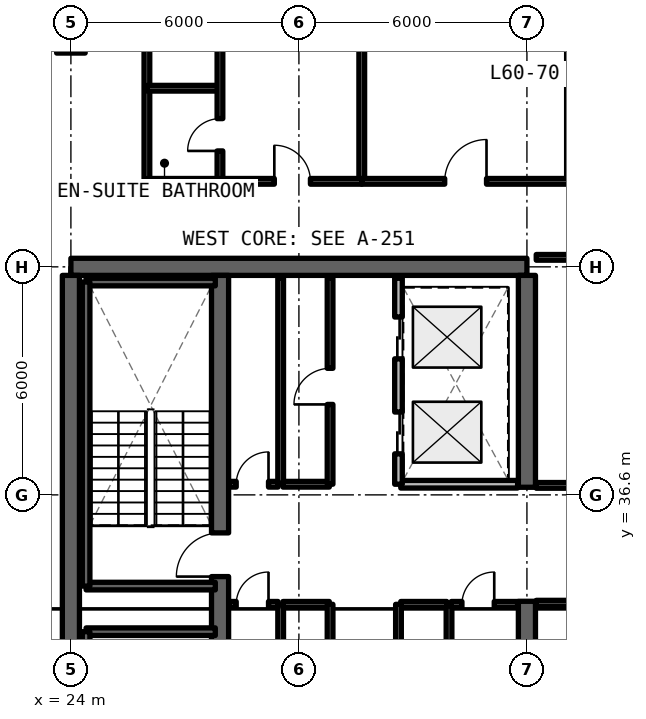
"""IFC4 building model, lengths in metres.
Left out: names, types, materials, properties, quantities, classifications, styles, units other than length and angle.
Written with IfcOpenShell. Run it as: python <this file> out.ifc"""

import sys

from ifc_helpers import new_model, si_unit, direction, frame, frame_2d, origin, origin_2d, place, context, subcontext, project, spatial, rectangle, extrude, element, fill, save


model = new_model("IFC4")
c1 = context("Model", 3, precision=1e-05, world=origin(), true_north=direction((0.0, 1.0)))
c2 = subcontext(c1, "Body", "Model", "MODEL_VIEW")
j1 = project(units=[si_unit("LENGTHUNIT", "METRE"), si_unit("PLANEANGLEUNIT", "RADIAN")], contexts=[c1])
p1 = place(None, origin())
s1 = spatial("IfcSite", under=j1, at=p1, CompositionType="ELEMENT")
p2 = place(p1, origin())
s2 = spatial("IfcBuilding", under=s1, at=p2, CompositionType="ELEMENT")
p3 = place(p2, frame((0.0, 0.0, 215.49)))
s3 = spatial("IfcBuildingStorey", under=s2, at=p3, CompositionType="ELEMENT", Elevation=215.49)
p4 = place(p3, frame((36.0, 42.6, 0.0), z_axis=(0.0, 0.0, 1.0), x_axis=(-1.0, 0.0, 0.0)))
e1 = element("IfcWall", 1, at=p4, inside=s3, PredefinedType="SHEAR", context=c2, shape_type="SweptSolid", body=[
    extrude(rectangle(XDim=12.0, YDim=0.45, at=frame_2d((6.0, 0.0))), origin(), (0.0, 0.0, 1.0), 3.63),
])
p5 = place(p3, frame((24.0, 24.825, 0.0), z_axis=(0.0, 0.0, 1.0), x_axis=(0.0, 1.0, 0.0)))
e2 = element("IfcWall", 2, at=p5, inside=s3, PredefinedType="SHEAR", context=c2, shape_type="SweptSolid", body=[
    extrude(rectangle(XDim=17.55, YDim=0.45, at=frame_2d((8.775, 0.0))), origin(), (0.0, 0.0, 1.0), 3.63),
])
p6 = place(p3, frame((36.0, 24.825, 0.0), z_axis=(0.0, 0.0, 1.0), x_axis=(0.0, 1.0, 0.0)))
e3 = element("IfcWall", 3, at=p6, inside=s3, PredefinedType="SHEAR", context=c2, shape_type="SweptSolid", body=[
    extrude(rectangle(XDim=8.975, YDim=0.45, at=frame_2d((4.488, 0.0))), origin(), (0.0, 0.0, 1.0), 3.63),
])
p7 = place(p3, frame((36.0, 36.8, 0.0), z_axis=(0.0, 0.0, 1.0), x_axis=(0.0, 1.0, 0.0)))
e4 = element("IfcWall", 4, at=p7, inside=s3, PredefinedType="SHEAR", context=c2, shape_type="SweptSolid", body=[
    extrude(rectangle(XDim=5.575, YDim=0.45, at=frame_2d((2.788, 0.0))), origin(), (0.0, 0.0, 1.0), 3.63),
])
p8 = place(p3, frame((27.925, 24.825, 0.0), z_axis=(0.0, 0.0, 1.0), x_axis=(0.0, 1.0, 0.0)))
e5 = element("IfcWall", 5, at=p8, inside=s3, PredefinedType="SHEAR", context=c2, shape_type="SweptSolid", body=[
    extrude(rectangle(XDim=17.55, YDim=0.45, at=frame_2d((8.775, 0.0))), origin(), (0.0, 0.0, 1.0), 3.63),
])
p9 = place(p8, frame((0.425, 0.0, 0.0)))
e6 = element("IfcOpeningElement", 6, at=p9, cuts=e5, PredefinedType="OPENING", context=c2, shape_type="SweptSolid", body=[
    extrude(rectangle(XDim=1.15, YDim=2.15, at=frame_2d((0.575, 1.075))), frame((0.0, 0.235, 0.0), z_axis=(0.0, -1.0, 0.0), x_axis=(1.0, 0.0, 0.0)), (0.0, 0.0, 1.0), 0.47),
])
p10 = place(p8, frame((9.625, 0.0, 0.0)))
e7 = element("IfcOpeningElement", 7, at=p10, cuts=e5, PredefinedType="OPENING", context=c2, shape_type="SweptSolid", body=[
    extrude(rectangle(XDim=1.15, YDim=2.15, at=frame_2d((0.575, 1.075))), frame((0.0, 0.235, 0.0), z_axis=(0.0, -1.0, 0.0), x_axis=(1.0, 0.0, 0.0)), (0.0, 0.0, 1.0), 0.47),
])
p11 = place(p3, frame((24.0, 48.6, 0.0), z_axis=(0.0, 0.0, 1.0), x_axis=(1.0, 0.0, 0.0)))
e8 = element("IfcColumn", 8, at=p11, inside=s3, PredefinedType="COLUMN", context=c2, shape_type="SweptSolid", body=[
    extrude(rectangle(XDim=0.75, YDim=0.75, at=origin_2d()), origin(), (0.0, 0.0, 1.0), 3.63),
])
p12 = place(p3, frame((29.52, 28.5, 0.0), z_axis=(0.0, 0.0, 1.0), x_axis=(0.0, 1.0, 0.0)))
e9 = element("IfcWall", 9, at=p12, inside=s3, PredefinedType="SOLIDWALL", context=c2, shape_type="SweptSolid", body=[
    extrude(rectangle(XDim=5.22, YDim=0.15, at=frame_2d((2.61, 0.0))), origin(), (0.0, 0.0, 1.0), 2.63),
])
p13 = place(p3, frame((28.17, 33.72, 0.0), z_axis=(0.0, 0.0, 1.0), x_axis=(1.0, 0.0, 0.0)))
e10 = element("IfcWall", 10, at=p13, inside=s3, PredefinedType="SOLIDWALL", context=c2, shape_type="SweptSolid", body=[
    extrude(rectangle(XDim=1.28, YDim=0.15, at=frame_2d((0.64, 0.0))), origin(), (0.0, 0.0, 1.0), 2.63),
])
p14 = place(p13, frame((0.18, 0.0, 0.0)))
e11 = element("IfcOpeningElement", 11, at=p14, cuts=e10, PredefinedType="OPENING", context=c2, shape_type="SweptSolid", body=[
    extrude(rectangle(XDim=0.85, YDim=2.1, at=frame_2d((0.425, 1.05))), frame((0.0, 0.085, 0.0), z_axis=(0.0, -1.0, 0.0), x_axis=(1.0, 0.0, 0.0)), (0.0, 0.0, 1.0), 0.17),
])
p15 = place(p3, frame((29.58, 33.72, 0.0), z_axis=(0.0, 0.0, 1.0), x_axis=(1.0, 0.0, 0.0)))
e12 = element("IfcWall", 12, at=p15, inside=s3, PredefinedType="SOLIDWALL", context=c2, shape_type="SweptSolid", body=[
    extrude(rectangle(XDim=1.22, YDim=0.15, at=frame_2d((0.61, 0.0))), origin(), (0.0, 0.0, 1.0), 2.63),
])
p16 = place(p3, frame((30.82, 28.5, 0.0), z_axis=(0.0, 0.0, 1.0), x_axis=(0.0, 1.0, 0.0)))
e13 = element("IfcWall", 13, at=p16, inside=s3, PredefinedType="SOLIDWALL", context=c2, shape_type="SweptSolid", body=[
    extrude(rectangle(XDim=5.22, YDim=0.15, at=frame_2d((2.61, 0.0))), origin(), (0.0, 0.0, 1.0), 2.63),
])
p17 = place(p16, frame((2.0, 0.0, 0.0)))
e14 = element("IfcOpeningElement", 14, at=p17, cuts=e13, PredefinedType="OPENING", context=c2, shape_type="SweptSolid", body=[
    extrude(rectangle(XDim=0.95, YDim=2.15, at=frame_2d((0.475, 1.075))), frame((0.0, 0.085, 0.0), z_axis=(0.0, -1.0, 0.0), x_axis=(1.0, 0.0, 0.0)), (0.0, 0.0, 1.0), 0.17),
])
p18 = place(p3, frame((33.95, 28.5, 0.0), z_axis=(0.0, 0.0, 1.0), x_axis=(0.0, 1.0, 0.0)))
e15 = element("IfcWall", 15, at=p18, inside=s3, PredefinedType="SOLIDWALL", context=c2, shape_type="SweptSolid", body=[
    extrude(rectangle(XDim=5.22, YDim=0.15, at=frame_2d((2.61, 0.0))), origin(), (0.0, 0.0, 1.0), 2.63),
])
p19 = place(p3, frame((32.68, 33.72, 0.0), z_axis=(0.0, 0.0, 1.0), x_axis=(1.0, 0.0, 0.0)))
e16 = element("IfcWall", 16, at=p19, inside=s3, PredefinedType="SOLIDWALL", context=c2, shape_type="SweptSolid", body=[
    extrude(rectangle(XDim=1.21, YDim=0.15, at=frame_2d((0.605, 0.0))), origin(), (0.0, 0.0, 1.0), 2.63),
])
p20 = place(p3, frame((34.01, 33.72, 0.0), z_axis=(0.0, 0.0, 1.0), x_axis=(1.0, 0.0, 0.0)))
e17 = element("IfcWall", 17, at=p20, inside=s3, PredefinedType="SOLIDWALL", context=c2, shape_type="SweptSolid", body=[
    extrude(rectangle(XDim=1.745, YDim=0.15, at=frame_2d((0.873, 0.0))), origin(), (0.0, 0.0, 1.0), 2.63),
])
p21 = place(p20, frame((0.28, 0.0, 0.0)))
e18 = element("IfcOpeningElement", 18, at=p21, cuts=e17, PredefinedType="OPENING", context=c2, shape_type="SweptSolid", body=[
    extrude(rectangle(XDim=0.85, YDim=2.1, at=frame_2d((0.425, 1.05))), frame((0.0, 0.085, 0.0), z_axis=(0.0, -1.0, 0.0), x_axis=(1.0, 0.0, 0.0)), (0.0, 0.0, 1.0), 0.17),
])
p22 = place(p3, frame((32.62, 28.5, 0.0), z_axis=(0.0, 0.0, 1.0), x_axis=(0.0, 1.0, 0.0)))
e19 = element("IfcWall", 19, at=p22, inside=s3, PredefinedType="SOLIDWALL", context=c2, shape_type="SweptSolid", body=[
    extrude(rectangle(XDim=5.22, YDim=0.15, at=frame_2d((2.61, 0.0))), origin(), (0.0, 0.0, 1.0), 2.63),
])
p23 = place(p22, frame((2.0, 0.0, 0.0)))
e20 = element("IfcOpeningElement", 20, at=p23, cuts=e19, PredefinedType="OPENING", context=c2, shape_type="SweptSolid", body=[
    extrude(rectangle(XDim=0.95, YDim=2.15, at=frame_2d((0.475, 1.075))), frame((0.0, 0.085, 0.0), z_axis=(0.0, -1.0, 0.0), x_axis=(1.0, 0.0, 0.0)), (0.0, 0.0, 1.0), 0.17),
])
p24 = place(p3, frame((29.52, 36.88, 0.0), z_axis=(0.0, 0.0, 1.0), x_axis=(0.0, 1.0, 0.0)))
e21 = element("IfcWall", 21, at=p24, inside=s3, PredefinedType="SOLIDWALL", context=c2, shape_type="SweptSolid", body=[
    extrude(rectangle(XDim=5.42, YDim=0.15, at=frame_2d((2.71, 0.0))), origin(), (0.0, 0.0, 1.0), 2.63),
])
p25 = place(p3, frame((28.17, 36.88, 0.0), z_axis=(0.0, 0.0, 1.0), x_axis=(1.0, 0.0, 0.0)))
e22 = element("IfcWall", 22, at=p25, inside=s3, PredefinedType="SOLIDWALL", context=c2, shape_type="SweptSolid", body=[
    extrude(rectangle(XDim=1.28, YDim=0.15, at=frame_2d((0.64, 0.0))), origin(), (0.0, 0.0, 1.0), 2.63),
])
p26 = place(p25, frame((0.18, 0.0, 0.0)))
e23 = element("IfcOpeningElement", 23, at=p26, cuts=e22, PredefinedType="OPENING", context=c2, shape_type="SweptSolid", body=[
    extrude(rectangle(XDim=0.85, YDim=2.1, at=frame_2d((0.425, 1.05))), frame((0.0, 0.085, 0.0), z_axis=(0.0, -1.0, 0.0), x_axis=(1.0, 0.0, 0.0)), (0.0, 0.0, 1.0), 0.17),
])
p27 = place(p3, frame((29.58, 36.88, 0.0), z_axis=(0.0, 0.0, 1.0), x_axis=(1.0, 0.0, 0.0)))
e24 = element("IfcWall", 24, at=p27, inside=s3, PredefinedType="SOLIDWALL", context=c2, shape_type="SweptSolid", body=[
    extrude(rectangle(XDim=1.22, YDim=0.15, at=frame_2d((0.61, 0.0))), origin(), (0.0, 0.0, 1.0), 2.63),
])
p28 = place(p3, frame((30.82, 36.88, 0.0), z_axis=(0.0, 0.0, 1.0), x_axis=(0.0, 1.0, 0.0)))
e25 = element("IfcWall", 25, at=p28, inside=s3, PredefinedType="SOLIDWALL", context=c2, shape_type="SweptSolid", body=[
    extrude(rectangle(XDim=5.42, YDim=0.15, at=frame_2d((2.71, 0.0))), origin(), (0.0, 0.0, 1.0), 2.63),
])
p29 = place(p28, frame((2.1, 0.0, 0.0)))
e26 = element("IfcOpeningElement", 26, at=p29, cuts=e25, PredefinedType="OPENING", context=c2, shape_type="SweptSolid", body=[
    extrude(rectangle(XDim=0.95, YDim=2.15, at=frame_2d((0.475, 1.075))), frame((0.0, 0.085, 0.0), z_axis=(0.0, -1.0, 0.0), x_axis=(1.0, 0.0, 0.0)), (0.0, 0.0, 1.0), 0.17),
])
p30 = place(p3, frame((32.68, 36.88, 0.0), z_axis=(0.0, 0.0, 1.0), x_axis=(1.0, 0.0, 0.0)))
e27 = element("IfcWall", 27, at=p30, inside=s3, PredefinedType="SOLIDWALL", context=c2, shape_type="SweptSolid", body=[
    extrude(rectangle(XDim=3.075, YDim=0.2, at=frame_2d((1.538, 0.0))), origin(), (0.0, 0.0, 1.0), 2.63),
])
p31 = place(p3, frame((32.62, 36.88, 0.0), z_axis=(0.0, 0.0, 1.0), x_axis=(0.0, 1.0, 0.0)))
e28 = element("IfcWall", 28, at=p31, inside=s3, PredefinedType="SOLIDWALL", context=c2, shape_type="SweptSolid", body=[
    extrude(rectangle(XDim=5.42, YDim=0.2, at=frame_2d((2.71, 0.0))), origin(), (0.0, 0.0, 1.0), 2.63),
])
p32 = place(p31, frame((0.8, 0.0, 0.0)))
e29 = element("IfcOpeningElement", 29, at=p32, cuts=e28, PredefinedType="OPENING", context=c2, shape_type="SweptSolid", body=[
    extrude(rectangle(XDim=1.1, YDim=2.2, at=frame_2d((0.55, 1.1))), frame((0.0, 0.11, 0.0), z_axis=(0.0, -1.0, 0.0), x_axis=(1.0, 0.0, 0.0)), (0.0, 0.0, 1.0), 0.22),
])
p33 = place(p31, frame((3.3, 0.0, 0.0)))
e30 = element("IfcOpeningElement", 30, at=p33, cuts=e28, PredefinedType="OPENING", context=c2, shape_type="SweptSolid", body=[
    extrude(rectangle(XDim=1.1, YDim=2.2, at=frame_2d((0.55, 1.1))), frame((0.0, 0.11, 0.0), z_axis=(0.0, -1.0, 0.0), x_axis=(1.0, 0.0, 0.0)), (0.0, 0.0, 1.0), 0.22),
])
p34 = place(p3, frame((36.245, 33.75, 0.0), z_axis=(0.0, 0.0, 1.0), x_axis=(1.0, 0.0, 0.0)))
e31 = element("IfcWall", 31, at=p34, inside=s3, PredefinedType="SOLIDWALL", context=c2, shape_type="SweptSolid", body=[
    extrude(rectangle(XDim=7.905, YDim=0.15, at=frame_2d((3.952, 0.0))), origin(), (0.0, 0.0, 1.0), 2.63),
])
p35 = place(p34, frame((3.478, 0.0, 0.0)))
e32 = element("IfcOpeningElement", 32, at=p35, cuts=e31, PredefinedType="OPENING", context=c2, shape_type="SweptSolid", body=[
    extrude(rectangle(XDim=0.95, YDim=2.15, at=frame_2d((0.475, 1.075))), frame((0.0, 0.085, 0.0), z_axis=(0.0, -1.0, 0.0), x_axis=(1.0, 0.0, 0.0)), (0.0, 0.0, 1.0), 0.17),
])
p36 = place(p3, frame((36.245, 36.85, 0.0), z_axis=(0.0, 0.0, 1.0), x_axis=(1.0, 0.0, 0.0)))
e33 = element("IfcWall", 33, at=p36, inside=s3, PredefinedType="SOLIDWALL", context=c2, shape_type="SweptSolid", body=[
    extrude(rectangle(XDim=7.905, YDim=0.15, at=frame_2d((3.952, 0.0))), origin(), (0.0, 0.0, 1.0), 2.63),
])
p37 = place(p36, frame((3.478, 0.0, 0.0)))
e34 = element("IfcOpeningElement", 34, at=p37, cuts=e33, PredefinedType="OPENING", context=c2, shape_type="SweptSolid", body=[
    extrude(rectangle(XDim=0.95, YDim=2.15, at=frame_2d((0.475, 1.075))), frame((0.0, 0.085, 0.0), z_axis=(0.0, -1.0, 0.0), x_axis=(1.0, 0.0, 0.0)), (0.0, 0.0, 1.0), 0.17),
])
p38 = place(p3, frame((36.245, 42.85, 0.0), z_axis=(0.0, 0.0, 1.0), x_axis=(1.0, 0.0, 0.0)))
e35 = element("IfcWall", 35, at=p38, inside=s3, PredefinedType="SOLIDWALL", context=c2, shape_type="SweptSolid", body=[
    extrude(rectangle(XDim=7.905, YDim=0.15, at=frame_2d((3.952, 0.0))), origin(), (0.0, 0.0, 1.0), 2.63),
])
for number, where, z_axis, x_axis in (
    (36, (26.0, 44.85, 0.0), (0.0, 0.0, 1.0), (0.0, 1.0, 0.0)),
    (37, (31.654, 44.85, 0.0), (0.0, 0.0, 1.0), (0.0, 1.0, 0.0)),
):
    element("IfcWall", number, at=place(p3, frame(where, z_axis=z_axis, x_axis=x_axis)), inside=s3, PredefinedType="SOLIDWALL", context=c2, shape_type="SweptSolid", body=[
        extrude(rectangle(XDim=10.08, YDim=0.15, at=frame_2d((5.04, 0.0))), origin(), (0.0, 0.0, 1.0), 2.63),
    ])
p39 = place(p3, frame((26.0, 47.3, 0.0), z_axis=(0.0, 0.0, 1.0), x_axis=(1.0, 0.0, 0.0)))
e38 = element("IfcWall", 38, at=p39, inside=s3, PredefinedType="PARTITIONING", context=c2, shape_type="SweptSolid", body=[
    extrude(rectangle(XDim=1.922, YDim=0.15, at=frame_2d((0.961, 0.0))), origin(), (0.0, 0.0, 1.0), 2.63),
])
p40 = place(p3, frame((27.922, 44.85, 0.0), z_axis=(0.0, 0.0, 1.0), x_axis=(0.0, 1.0, 0.0)))
e39 = element("IfcWall", 39, at=p40, inside=s3, PredefinedType="PARTITIONING", context=c2, shape_type="SweptSolid", body=[
    extrude(rectangle(XDim=10.08, YDim=0.15, at=frame_2d((5.04, 0.0))), origin(), (0.0, 0.0, 1.0), 2.63),
])
p41 = place(p40, frame((0.8, 0.0, 0.0)))
e40 = element("IfcOpeningElement", 40, at=p41, cuts=e39, PredefinedType="OPENING", context=c2, shape_type="SweptSolid", body=[
    extrude(rectangle(XDim=0.85, YDim=2.1, at=frame_2d((0.425, 1.05))), frame((0.0, 0.085, 0.0), z_axis=(0.0, -1.0, 0.0), x_axis=(1.0, 0.0, 0.0)), (0.0, 0.0, 1.0), 0.17),
])
p42 = place(p40, frame((5.162, 0.0, 0.0)))
e41 = element("IfcOpeningElement", 41, at=p42, cuts=e39, PredefinedType="OPENING", context=c2, shape_type="SweptSolid", body=[
    extrude(rectangle(XDim=0.85, YDim=2.1, at=frame_2d((0.425, 1.05))), frame((0.0, 0.085, 0.0), z_axis=(0.0, -1.0, 0.0), x_axis=(1.0, 0.0, 0.0)), (0.0, 0.0, 1.0), 0.17),
])
p43 = place(p3, frame((26.0, 44.85, 0.0), z_axis=(0.0, 0.0, 1.0), x_axis=(1.0, 0.0, 0.0)))
e42 = element("IfcWall", 42, at=p43, inside=s3, PredefinedType="SOLIDWALL", context=c2, shape_type="SweptSolid", body=[
    extrude(rectangle(XDim=5.654, YDim=0.15, at=frame_2d((2.827, 0.0))), origin(), (0.0, 0.0, 1.0), 2.63),
])
p44 = place(p43, frame((3.353, 0.0, 0.0)))
e43 = element("IfcOpeningElement", 43, at=p44, cuts=e42, PredefinedType="OPENING", context=c2, shape_type="SweptSolid", body=[
    extrude(rectangle(XDim=0.95, YDim=2.15, at=frame_2d((0.475, 1.075))), frame((0.0, 0.085, 0.0), z_axis=(0.0, -1.0, 0.0), x_axis=(1.0, 0.0, 0.0)), (0.0, 0.0, 1.0), 0.17),
])
p45 = place(p3, frame((31.654, 44.85, 0.0), z_axis=(0.0, 0.0, 1.0), x_axis=(1.0, 0.0, 0.0)))
e44 = element("IfcWall", 44, at=p45, inside=s3, PredefinedType="SOLIDWALL", context=c2, shape_type="SweptSolid", body=[
    extrude(rectangle(XDim=5.466, YDim=0.15, at=frame_2d((2.733, 0.0))), origin(), (0.0, 0.0, 1.0), 2.63),
])
p46 = place(p45, frame((2.183, 0.0, 0.0)))
e45 = element("IfcOpeningElement", 45, at=p46, cuts=e44, PredefinedType="OPENING", context=c2, shape_type="SweptSolid", body=[
    extrude(rectangle(XDim=1.1, YDim=2.15, at=frame_2d((0.55, 1.075))), frame((0.0, 0.085, 0.0), z_axis=(0.0, -1.0, 0.0), x_axis=(1.0, 0.0, 0.0)), (0.0, 0.0, 1.0), 0.17),
])
p47 = place(p3, frame((27.8, 33.0, 0.0), z_axis=(0.0, 0.0, 1.0), x_axis=(-1.0, 0.0, 0.0)))
e46 = element("IfcWall", 46, at=p47, inside=s3, PredefinedType="SOLIDWALL", context=c2, shape_type="SweptSolid", body=[
    extrude(rectangle(XDim=3.4, YDim=0.2, at=frame_2d((1.7, 0.0))), origin(), (0.0, 0.0, 1.0), 3.63),
])
p48 = place(p3, frame((24.4, 33.0, 0.0), z_axis=(0.0, 0.0, 1.0), x_axis=(0.0, -1.0, 0.0)))
e47 = element("IfcWall", 47, at=p48, inside=s3, PredefinedType="SOLIDWALL", context=c2, shape_type="SweptSolid", body=[
    extrude(rectangle(XDim=8.0, YDim=0.2, at=frame_2d((4.0, 0.0))), origin(), (0.0, 0.0, 1.0), 3.63),
])
for number, where, z_axis, x_axis in (
    (48, (24.4, 34.2, 0.0), (0.0, 0.0, 1.0), (1.0, 0.0, 0.0)),
    (49, (27.8, 42.2, 0.0), (0.0, 0.0, 1.0), (-1.0, 0.0, 0.0)),
):
    element("IfcWall", number, at=place(p3, frame(where, z_axis=z_axis, x_axis=x_axis)), inside=s3, PredefinedType="SOLIDWALL", context=c2, shape_type="SweptSolid", body=[
        extrude(rectangle(XDim=3.4, YDim=0.2, at=frame_2d((1.7, 0.0))), origin(), (0.0, 0.0, 1.0), 3.63),
    ])
p49 = place(p3, frame((24.4, 42.2, 0.0), z_axis=(0.0, 0.0, 1.0), x_axis=(0.0, -1.0, 0.0)))
e50 = element("IfcWall", 50, at=p49, inside=s3, PredefinedType="SOLIDWALL", context=c2, shape_type="SweptSolid", body=[
    extrude(rectangle(XDim=8.0, YDim=0.2, at=frame_2d((4.0, 0.0))), origin(), (0.0, 0.0, 1.0), 3.63),
])
p50 = place(p14, origin())
e51 = element("IfcDoor", 51, at=p50, inside=s3, OperationType="SINGLE_SWING_RIGHT", PredefinedType="DOOR", context=c2, shape_type="SweptSolid", body=[
    extrude(rectangle(XDim=0.85, YDim=2.1, at=frame_2d((0.425, 1.05))), frame((0.0, 0.025, 0.0), z_axis=(0.0, -1.0, 0.0), x_axis=(1.0, 0.0, 0.0)), (0.0, 0.0, 1.0), 0.05),
])
fill(e11, e51)
p51 = place(p21, origin())
e52 = element("IfcDoor", 52, at=p51, inside=s3, OperationType="SINGLE_SWING_RIGHT", PredefinedType="DOOR", context=c2, shape_type="SweptSolid", body=[
    extrude(rectangle(XDim=0.85, YDim=2.1, at=frame_2d((0.425, 1.05))), frame((0.0, 0.025, 0.0), z_axis=(0.0, -1.0, 0.0), x_axis=(1.0, 0.0, 0.0)), (0.0, 0.0, 1.0), 0.05),
])
fill(e18, e52)
p52 = place(p26, origin())
e53 = element("IfcDoor", 53, at=p52, inside=s3, OperationType="SINGLE_SWING_RIGHT", PredefinedType="DOOR", context=c2, shape_type="SweptSolid", body=[
    extrude(rectangle(XDim=0.85, YDim=2.1, at=frame_2d((0.425, 1.05))), frame((0.0, 0.025, 0.0), z_axis=(0.0, -1.0, 0.0), x_axis=(1.0, 0.0, 0.0)), (0.0, 0.0, 1.0), 0.05),
])
fill(e23, e53)
p53 = place(p29, origin())
e54 = element("IfcDoor", 54, at=p53, inside=s3, OperationType="SINGLE_SWING_LEFT", PredefinedType="DOOR", context=c2, shape_type="SweptSolid", body=[
    extrude(rectangle(XDim=0.95, YDim=2.15, at=frame_2d((0.475, 1.075))), frame((0.0, 0.025, 0.0), z_axis=(0.0, -1.0, 0.0), x_axis=(1.0, 0.0, 0.0)), (0.0, 0.0, 1.0), 0.05),
])
fill(e26, e54)
p54 = place(p32, origin())
e55 = element("IfcDoor", 55, at=p54, inside=s3, OperationType="SLIDING_TO_LEFT", PredefinedType="DOOR", context=c2, shape_type="SweptSolid", body=[
    extrude(rectangle(XDim=1.1, YDim=2.2, at=frame_2d((0.55, 1.1))), frame((0.0, 0.025, 0.0), z_axis=(0.0, -1.0, 0.0), x_axis=(1.0, 0.0, 0.0)), (0.0, 0.0, 1.0), 0.05),
])
fill(e29, e55)
p55 = place(p33, origin())
e56 = element("IfcDoor", 56, at=p55, inside=s3, OperationType="SLIDING_TO_RIGHT", PredefinedType="DOOR", context=c2, shape_type="SweptSolid", body=[
    extrude(rectangle(XDim=1.1, YDim=2.2, at=frame_2d((0.55, 1.1))), frame((0.0, 0.025, 0.0), z_axis=(0.0, -1.0, 0.0), x_axis=(1.0, 0.0, 0.0)), (0.0, 0.0, 1.0), 0.05),
])
fill(e30, e56)
p56 = place(p41, origin())
e57 = element("IfcDoor", 57, at=p56, inside=s3, OperationType="SINGLE_SWING_LEFT", PredefinedType="DOOR", context=c2, shape_type="SweptSolid", body=[
    extrude(rectangle(XDim=0.85, YDim=2.1, at=frame_2d((0.425, 1.05))), frame((0.0, 0.025, 0.0), z_axis=(0.0, -1.0, 0.0), x_axis=(1.0, 0.0, 0.0)), (0.0, 0.0, 1.0), 0.05),
])
fill(e40, e57)
p57 = place(p44, origin())
e58 = element("IfcDoor", 58, at=p57, inside=s3, OperationType="SINGLE_SWING_LEFT", PredefinedType="DOOR", context=c2, shape_type="SweptSolid", body=[
    extrude(rectangle(XDim=0.95, YDim=2.15, at=frame_2d((0.475, 1.075))), frame((0.0, 0.025, 0.0), z_axis=(0.0, -1.0, 0.0), x_axis=(1.0, 0.0, 0.0)), (0.0, 0.0, 1.0), 0.05),
])
fill(e43, e58)
p58 = place(p46, origin())
e59 = element("IfcDoor", 59, at=p58, inside=s3, OperationType="SINGLE_SWING_RIGHT", PredefinedType="DOOR", context=c2, shape_type="SweptSolid", body=[
    extrude(rectangle(XDim=1.1, YDim=2.15, at=frame_2d((0.55, 1.075))), frame((0.0, 0.025, 0.0), z_axis=(0.0, -1.0, 0.0), x_axis=(1.0, 0.0, 0.0)), (0.0, 0.0, 1.0), 0.05),
])
fill(e45, e59)
p59 = place(p10, origin())
e60 = element("IfcDoor", 60, at=p59, inside=s3, OperationType="SINGLE_SWING_LEFT", PredefinedType="DOOR", context=c2, shape_type="SweptSolid", body=[
    extrude(rectangle(XDim=1.15, YDim=2.15, at=frame_2d((0.575, 1.075))), frame((0.0, 0.025, 0.0), z_axis=(0.0, -1.0, 0.0), x_axis=(1.0, 0.0, 0.0)), (0.0, 0.0, 1.0), 0.05),
])
fill(e7, e60)
save(model, sys.argv[1])
